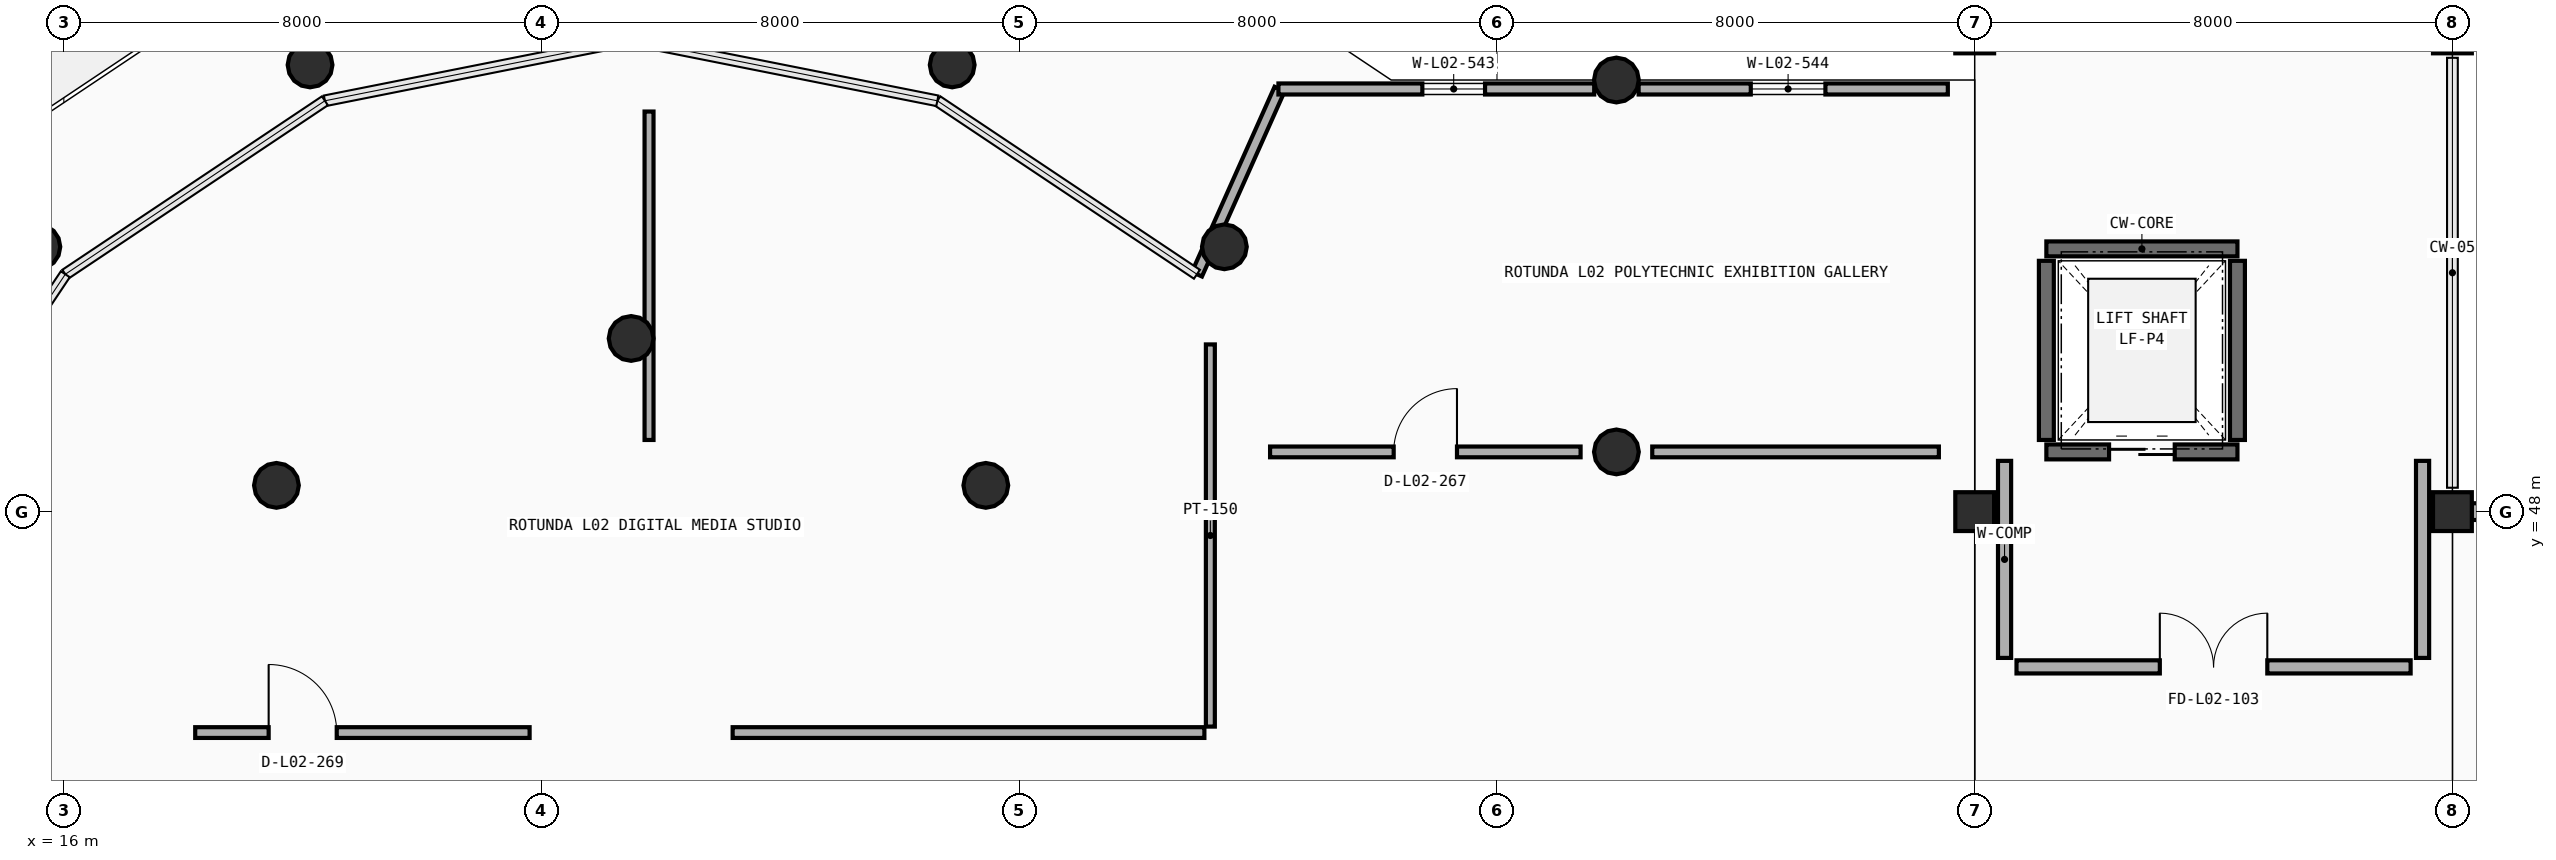
"""IFC4 building model, lengths in metres.
Left out: names, types, materials, properties, quantities, classifications, styles, units other than length and angle.
Written with IfcOpenShell. Run it as: python <this file> out.ifc"""

import sys

from ifc_helpers import new_model, si_unit, direction, frame, frame_2d, origin, origin_2d, place, context, subcontext, project, spatial, rectangle, circle, extrude, element, fill, save


model = new_model("IFC4")
c1 = context("Model", 3, precision=1e-05, world=origin(), true_north=direction((0.0, 1.0)))
c2 = subcontext(c1, "Body", "Model", "MODEL_VIEW")
j1 = project(units=[si_unit("LENGTHUNIT", "METRE"), si_unit("PLANEANGLEUNIT", "RADIAN")], contexts=[c1])
p1 = place(None, origin())
s1 = spatial("IfcSite", under=j1, at=p1, CompositionType="ELEMENT")
p2 = place(p1, origin())
s2 = spatial("IfcBuilding", under=s1, at=p2, CompositionType="ELEMENT")
p3 = place(p2, frame((0.0, 0.0, 4.8)))
s3 = spatial("IfcBuildingStorey", under=s2, at=p3, CompositionType="ELEMENT", Elevation=4.8)
for number, where, z_axis, x_axis in (
    (1, (48.0, 48.0, 0.0), (0.0, 0.0, 1.0), (1.0, 0.0, 0.0)),
    (2, (56.0, 48.0, 0.0), (0.0, 0.0, 1.0), (1.0, 0.0, 0.0)),
):
    element("IfcColumn", number, at=place(p3, frame(where, z_axis=z_axis, x_axis=x_axis)), inside=s3, PredefinedType="COLUMN", context=c2, shape_type="SweptSolid", body=[
        extrude(rectangle(XDim=0.65, YDim=0.65, at=origin_2d()), origin(), (0.0, 0.0, 1.0), 4.8),
    ])
for number, where, z_axis, x_axis in (
    (3, (19.56, 48.44, 0.0), (0.0, 0.0, 1.0), (1.0, 0.0, 0.0)),
    (4, (31.44, 48.44, 0.0), (0.0, 0.0, 1.0), (1.0, 0.0, 0.0)),
    (5, (42.0, 49.0, 0.0), (0.0, 0.0, 1.0), (1.0, 0.0, 0.0)),
    (6, (25.5, 50.9, 0.0), (0.0, 0.0, 1.0), (1.0, 0.0, 0.0)),
    (7, (15.565, 52.435, 0.0), (0.0, 0.0, 1.0), (1.0, 0.0, 0.0)),
    (8, (35.435, 52.435, 0.0), (0.0, 0.0, 1.0), (1.0, 0.0, 0.0)),
    (9, (42.0, 55.228, 0.0), (0.0, 0.0, 1.0), (1.0, 0.0, 0.0)),
    (10, (20.123, 55.48, 0.0), (0.0, 0.0, 1.0), (1.0, 0.0, 0.0)),
    (11, (30.877, 55.48, 0.0), (0.0, 0.0, 1.0), (1.0, 0.0, 0.0)),
):
    element("IfcColumn", number, at=place(p3, frame(where, z_axis=z_axis, x_axis=x_axis)), inside=s3, PredefinedType="COLUMN", context=c2, shape_type="SweptSolid", body=[
        extrude(circle(Radius=0.375, at=origin_2d()), origin(), (0.0, 0.0, 1.0), 4.8),
    ])
for number, where, z_axis, x_axis in (
    (12, (48.0, 56.0, 0.0), (0.0, 0.0, 1.0), (1.0, 0.0, 0.0)),
    (13, (56.0, 56.0, 0.0), (0.0, 0.0, 1.0), (1.0, 0.0, 0.0)),
):
    element("IfcColumn", number, at=place(p3, frame(where, z_axis=z_axis, x_axis=x_axis)), inside=s3, PredefinedType="COLUMN", context=c2, shape_type="SweptSolid", body=[
        extrude(rectangle(XDim=0.65, YDim=0.65, at=origin_2d()), origin(), (0.0, 0.0, 1.0), 4.8),
    ])
p4 = place(p3, frame((56.322, 48.0, 0.0), z_axis=(0.0, 0.0, 1.0), x_axis=(1.0, 0.0, 0.0)))
e14 = element("IfcWall", 14, at=p4, inside=s3, PredefinedType="STANDARD", context=c2, shape_type="SweptSolid", body=[
    extrude(rectangle(XDim=7.331, YDim=0.28, at=frame_2d((3.666, 0.0))), origin(), (0.0, 0.0, 1.0), 3.91),
])
p5 = place(p4, frame((2.258, 0.0, 0.9)))
e15 = element("IfcOpeningElement", 15, at=p5, cuts=e14, PredefinedType="OPENING", context=c2, shape_type="SweptSolid", body=[
    extrude(rectangle(XDim=1.05, YDim=1.55, at=frame_2d((0.525, 0.775))), frame((0.0, 0.15, 0.0), z_axis=(0.0, -1.0, 0.0), x_axis=(1.0, 0.0, 0.0)), (0.0, 0.0, 1.0), 0.3),
])
p6 = place(p3, frame((38.143, 55.143, 0.0), z_axis=(0.0, 0.0, 1.0), x_axis=(-0.831468390799, 0.555572061125, 0.0)))
e16 = element("IfcWall", 16, at=p6, inside=s3, PredefinedType="PARAPET", context=c2, shape_type="SweptSolid", body=[
    extrude(rectangle(XDim=6.977, YDim=0.2, at=frame_2d((3.488, 0.0))), origin(), (0.0, 0.0, 1.0), 1.15),
])
p7 = place(p3, frame((19.542, 56.472, 0.0), z_axis=(0.0, 0.0, 1.0), x_axis=(-0.831481620435, -0.555552261158, 0.0)))
e17 = element("IfcWall", 17, at=p7, inside=s3, PredefinedType="PARAPET", context=c2, shape_type="SweptSolid", body=[
    extrude(rectangle(XDim=5.618, YDim=0.18, at=frame_2d((2.809, 0.0))), origin(), (0.0, 0.0, 1.0), 1.15),
])
p8 = place(p3, frame((34.975, 51.975, 0.0), z_axis=(0.0, 0.0, 1.0), x_axis=(0.40761125598, 0.913155553013, 0.0)))
e18 = element("IfcWall", 18, at=p8, inside=s3, PredefinedType="STANDARD", context=c2, shape_type="SweptSolid", body=[
    extrude(rectangle(XDim=3.398, YDim=0.185, at=frame_2d((1.699, 0.0))), origin(), (0.0, 0.0, 1.0), 3.95),
])
p9 = place(p3, frame((36.34, 55.078, 0.0), z_axis=(0.0, 0.0, 1.0), x_axis=(1.0, 0.0, 0.0)))
e19 = element("IfcWall", 19, at=p9, inside=s3, PredefinedType="STANDARD", context=c2, shape_type="SweptSolid", body=[
    extrude(rectangle(XDim=5.288, YDim=0.185, at=frame_2d((2.644, 0.0))), origin(), (0.0, 0.0, 1.0), 3.925),
])
p10 = place(p9, frame((2.41, 0.0, 0.9)))
e20 = element("IfcOpeningElement", 20, at=p10, cuts=e19, PredefinedType="OPENING", context=c2, shape_type="SweptSolid", body=[
    extrude(rectangle(XDim=1.05, YDim=1.25, at=frame_2d((0.525, 0.625))), frame((0.0, 0.103, 0.0), z_axis=(0.0, -1.0, 0.0), x_axis=(1.0, 0.0, 0.0)), (0.0, 0.0, 1.0), 0.205),
])
p11 = place(p3, frame((42.372, 55.078, 0.0), z_axis=(0.0, 0.0, 1.0), x_axis=(1.0, 0.0, 0.0)))
e21 = element("IfcWall", 21, at=p11, inside=s3, PredefinedType="STANDARD", context=c2, shape_type="SweptSolid", body=[
    extrude(rectangle(XDim=5.178, YDim=0.185, at=frame_2d((2.589, 0.0))), origin(), (0.0, 0.0, 1.0), 3.925),
])
p12 = place(p11, frame((1.878, 0.0, 0.9)))
e22 = element("IfcOpeningElement", 22, at=p12, cuts=e21, PredefinedType="OPENING", context=c2, shape_type="SweptSolid", body=[
    extrude(rectangle(XDim=1.25, YDim=1.25, at=frame_2d((0.625, 0.625))), frame((0.0, 0.103, 0.0), z_axis=(0.0, -1.0, 0.0), x_axis=(1.0, 0.0, 0.0)), (0.0, 0.0, 1.0), 0.205),
])
p13 = place(p3, frame((12.878, 55.122, 3.37), z_axis=(0.0, 0.0, 1.0), x_axis=(0.831472806966, 0.555565451838, 0.0)))
e23 = element("IfcWall", 23, at=p13, inside=s3, PredefinedType="PARAPET", context=c2, shape_type="SweptSolid", body=[
    extrude(rectangle(XDim=6.965, YDim=0.2, at=frame_2d((3.482, 0.0))), origin(), (0.0, 0.0, 1.0), 1.62),
])
p14 = place(p3, frame((14.39, 53.832, 3.37), z_axis=(0.0, 0.0, 1.0), x_axis=(0.831462553548, 0.555580797046, 0.0)))
e24 = element("IfcWall", 24, at=p14, inside=s3, PredefinedType="PARAPET", context=c2, shape_type="SweptSolid", body=[
    extrude(rectangle(XDim=5.884, YDim=0.18, at=frame_2d((2.942, 0.0))), origin(), (0.0, 0.0, 1.0), 1.62),
])
p15 = place(p3, frame((49.2, 49.0, 0.0), z_axis=(0.0, 0.0, 1.0), x_axis=(1.0, 0.0, 0.0)))
e25 = element("IfcWall", 25, at=p15, inside=s3, PredefinedType="SOLIDWALL", context=c2, shape_type="SweptSolid", body=[
    extrude(rectangle(XDim=3.2, YDim=0.25, at=frame_2d((1.6, 0.0))), origin(), (0.0, 0.0, 1.0), 4.8),
])
p16 = place(p15, frame((1.05, 0.0, 0.0)))
e26 = element("IfcOpeningElement", 26, at=p16, cuts=e25, PredefinedType="OPENING", context=c2, shape_type="SweptSolid", body=[
    extrude(rectangle(XDim=1.1, YDim=2.15, at=frame_2d((0.55, 1.075))), frame((0.0, 0.135, 0.0), z_axis=(0.0, -1.0, 0.0), x_axis=(1.0, 0.0, 0.0)), (0.0, 0.0, 1.0), 0.27),
])
p17 = place(p3, frame((49.2, 52.4, 0.0), z_axis=(0.0, 0.0, 1.0), x_axis=(1.0, 0.0, 0.0)))
e27 = element("IfcWall", 27, at=p17, inside=s3, PredefinedType="SOLIDWALL", context=c2, shape_type="SweptSolid", body=[
    extrude(rectangle(XDim=3.2, YDim=0.25, at=frame_2d((1.6, 0.0))), origin(), (0.0, 0.0, 1.0), 4.8),
])
for number, where, z_axis, x_axis in (
    (28, (49.2, 49.2, 0.0), (0.0, 0.0, 1.0), (0.0, 1.0, 0.0)),
    (29, (52.4, 49.2, 0.0), (0.0, 0.0, 1.0), (0.0, 1.0, 0.0)),
):
    element("IfcWall", number, at=place(p3, frame(where, z_axis=z_axis, x_axis=x_axis)), inside=s3, PredefinedType="SOLIDWALL", context=c2, shape_type="SweptSolid", body=[
        extrude(rectangle(XDim=3.0, YDim=0.25, at=frame_2d((1.5, 0.0))), origin(), (0.0, 0.0, 1.0), 4.8),
    ])
p18 = place(p3, frame((48.7, 45.4, 0.0), z_axis=(0.0, 0.0, 1.0), x_axis=(1.0, 0.0, 0.0)))
e30 = element("IfcWall", 30, at=p18, inside=s3, PredefinedType="PARTITIONING", context=c2, shape_type="SweptSolid", body=[
    extrude(rectangle(XDim=6.6, YDim=0.22, at=frame_2d((3.3, 0.0))), origin(), (0.0, 0.0, 1.0), 3.9),
])
p19 = place(p18, frame((2.4, 0.0, 0.0)))
e31 = element("IfcOpeningElement", 31, at=p19, cuts=e30, PredefinedType="OPENING", context=c2, shape_type="SweptSolid", body=[
    extrude(rectangle(XDim=1.8, YDim=2.2, at=frame_2d((0.9, 1.1))), frame((0.0, 0.12, 0.0), z_axis=(0.0, -1.0, 0.0), x_axis=(1.0, 0.0, 0.0)), (0.0, 0.0, 1.0), 0.24),
])
for number, where, z_axis, x_axis in (
    (32, (48.5, 45.55, 0.0), (0.0, 0.0, 1.0), (0.0, 1.0, 0.0)),
    (33, (55.5, 45.55, 0.0), (0.0, 0.0, 1.0), (0.0, 1.0, 0.0)),
):
    element("IfcWall", number, at=place(p3, frame(where, z_axis=z_axis, x_axis=x_axis)), inside=s3, PredefinedType="PARTITIONING", context=c2, shape_type="SweptSolid", body=[
        extrude(rectangle(XDim=3.3, YDim=0.22, at=frame_2d((1.65, 0.0))), origin(), (0.0, 0.0, 1.0), 3.76),
    ])
p20 = place(p3, frame((42.6, 49.0, 0.0), z_axis=(0.0, 0.0, 1.0), x_axis=(1.0, 0.0, 0.0)))
e34 = element("IfcWall", 34, at=p20, inside=s3, PredefinedType="PARTITIONING", context=c2, shape_type="SweptSolid", body=[
    extrude(rectangle(XDim=4.8, YDim=0.18, at=frame_2d((2.4, 0.0))), origin(), (0.0, 0.0, 1.0), 3.875),
])
p21 = place(p3, frame((25.8, 49.2, 0.0), z_axis=(0.0, 0.0, 1.0), x_axis=(0.0, 1.0, 0.0)))
e35 = element("IfcWall", 35, at=p21, inside=s3, PredefinedType="PARTITIONING", context=c2, shape_type="SweptSolid", body=[
    extrude(rectangle(XDim=5.5, YDim=0.15, at=frame_2d((2.75, 0.0))), origin(), (0.0, 0.0, 1.0), 3.775),
])
p22 = place(p3, frame((36.2, 49.0, 0.0), z_axis=(0.0, 0.0, 1.0), x_axis=(1.0, 0.0, 0.0)))
e36 = element("IfcWall", 36, at=p22, inside=s3, PredefinedType="PARTITIONING", context=c2, shape_type="SweptSolid", body=[
    extrude(rectangle(XDim=5.2, YDim=0.18, at=frame_2d((2.6, 0.0))), origin(), (0.0, 0.0, 1.0), 3.9),
])
p23 = place(p22, frame((2.07, 0.0, 0.0)))
e37 = element("IfcOpeningElement", 37, at=p23, cuts=e36, PredefinedType="OPENING", context=c2, shape_type="SweptSolid", body=[
    extrude(rectangle(XDim=1.06, YDim=2.1, at=frame_2d((0.53, 1.05))), frame((0.0, 0.1, 0.0), z_axis=(0.0, -1.0, 0.0), x_axis=(1.0, 0.0, 0.0)), (0.0, 0.0, 1.0), 0.2),
])
p24 = place(p3, frame((27.2, 44.3, 0.0), z_axis=(0.0, 0.0, 1.0), x_axis=(1.0, 0.0, 0.0)))
e38 = element("IfcWall", 38, at=p24, inside=s3, PredefinedType="PARTITIONING", context=c2, shape_type="SweptSolid", body=[
    extrude(rectangle(XDim=7.9, YDim=0.18, at=frame_2d((3.95, 0.0))), origin(), (0.0, 0.0, 1.0), 3.9),
])
p25 = place(p3, frame((35.2, 44.4, 0.0), z_axis=(0.0, 0.0, 1.0), x_axis=(0.0, 1.0, 0.0)))
e39 = element("IfcWall", 39, at=p25, inside=s3, PredefinedType="PARTITIONING", context=c2, shape_type="SweptSolid", body=[
    extrude(rectangle(XDim=6.4, YDim=0.15, at=frame_2d((3.2, 0.0))), origin(), (0.0, 0.0, 1.0), 3.9),
])
p26 = place(p3, frame((18.2, 44.3, 0.0), z_axis=(0.0, 0.0, 1.0), x_axis=(1.0, 0.0, 0.0)))
e40 = element("IfcWall", 40, at=p26, inside=s3, PredefinedType="PARTITIONING", context=c2, shape_type="SweptSolid", body=[
    extrude(rectangle(XDim=5.6, YDim=0.18, at=frame_2d((2.8, 0.0))), origin(), (0.0, 0.0, 1.0), 3.9),
])
p27 = place(p26, frame((1.23, 0.0, 0.0)))
e41 = element("IfcOpeningElement", 41, at=p27, cuts=e40, PredefinedType="OPENING", context=c2, shape_type="SweptSolid", body=[
    extrude(rectangle(XDim=1.14, YDim=2.15, at=frame_2d((0.57, 1.075))), frame((0.0, 0.1, 0.0), z_axis=(0.0, -1.0, 0.0), x_axis=(1.0, 0.0, 0.0)), (0.0, 0.0, 1.0), 0.2),
])
p28 = place(p10, origin())
e42 = element("IfcWindow", 42, at=p28, inside=s3, PartitioningType="SINGLE_PANEL", PredefinedType="WINDOW", context=c2, shape_type="SweptSolid", body=[
    extrude(rectangle(XDim=1.05, YDim=1.25, at=frame_2d((0.525, 0.625))), frame((0.0, 0.03, 0.0), z_axis=(0.0, -1.0, 0.0), x_axis=(1.0, 0.0, 0.0)), (0.0, 0.0, 1.0), 0.06),
])
fill(e20, e42)
p29 = place(p12, origin())
e43 = element("IfcWindow", 43, at=p29, inside=s3, PartitioningType="SINGLE_PANEL", PredefinedType="WINDOW", context=c2, shape_type="SweptSolid", body=[
    extrude(rectangle(XDim=1.25, YDim=1.25, at=frame_2d((0.625, 0.625))), frame((0.0, 0.03, 0.0), z_axis=(0.0, -1.0, 0.0), x_axis=(1.0, 0.0, 0.0)), (0.0, 0.0, 1.0), 0.06),
])
fill(e22, e43)
p30 = place(p16, origin())
e44 = element("IfcDoor", 44, at=p30, inside=s3, OperationType="DOUBLE_DOOR_SLIDING", PredefinedType="DOOR", context=c2, shape_type="SweptSolid", body=[
    extrude(rectangle(XDim=1.1, YDim=2.15, at=frame_2d((0.55, 1.075))), frame((0.0, 0.025, 0.0), z_axis=(0.0, -1.0, 0.0), x_axis=(1.0, 0.0, 0.0)), (0.0, 0.0, 1.0), 0.05),
])
fill(e26, e44)
p31 = place(p19, origin())
e45 = element("IfcDoor", 45, at=p31, inside=s3, OperationType="DOUBLE_DOOR_SINGLE_SWING", PredefinedType="DOOR", context=c2, shape_type="SweptSolid", body=[
    extrude(rectangle(XDim=1.8, YDim=2.2, at=frame_2d((0.9, 1.1))), frame((0.0, 0.025, 0.0), z_axis=(0.0, -1.0, 0.0), x_axis=(1.0, 0.0, 0.0)), (0.0, 0.0, 1.0), 0.05),
])
fill(e31, e45)
p32 = place(p23, origin())
e46 = element("IfcDoor", 46, at=p32, inside=s3, OperationType="SINGLE_SWING_RIGHT", PredefinedType="DOOR", context=c2, shape_type="SweptSolid", body=[
    extrude(rectangle(XDim=1.06, YDim=2.1, at=frame_2d((0.53, 1.05))), frame((0.0, 0.025, 0.0), z_axis=(0.0, -1.0, 0.0), x_axis=(1.0, 0.0, 0.0)), (0.0, 0.0, 1.0), 0.05),
])
fill(e37, e46)
p33 = place(p27, origin())
e47 = element("IfcDoor", 47, at=p33, inside=s3, OperationType="SINGLE_SWING_LEFT", PredefinedType="DOOR", context=c2, shape_type="SweptSolid", body=[
    extrude(rectangle(XDim=1.14, YDim=2.15, at=frame_2d((0.57, 1.075))), frame((0.0, 0.025, 0.0), z_axis=(0.0, -1.0, 0.0), x_axis=(1.0, 0.0, 0.0)), (0.0, 0.0, 1.0), 0.05),
])
fill(e41, e47)
save(model, sys.argv[1])
